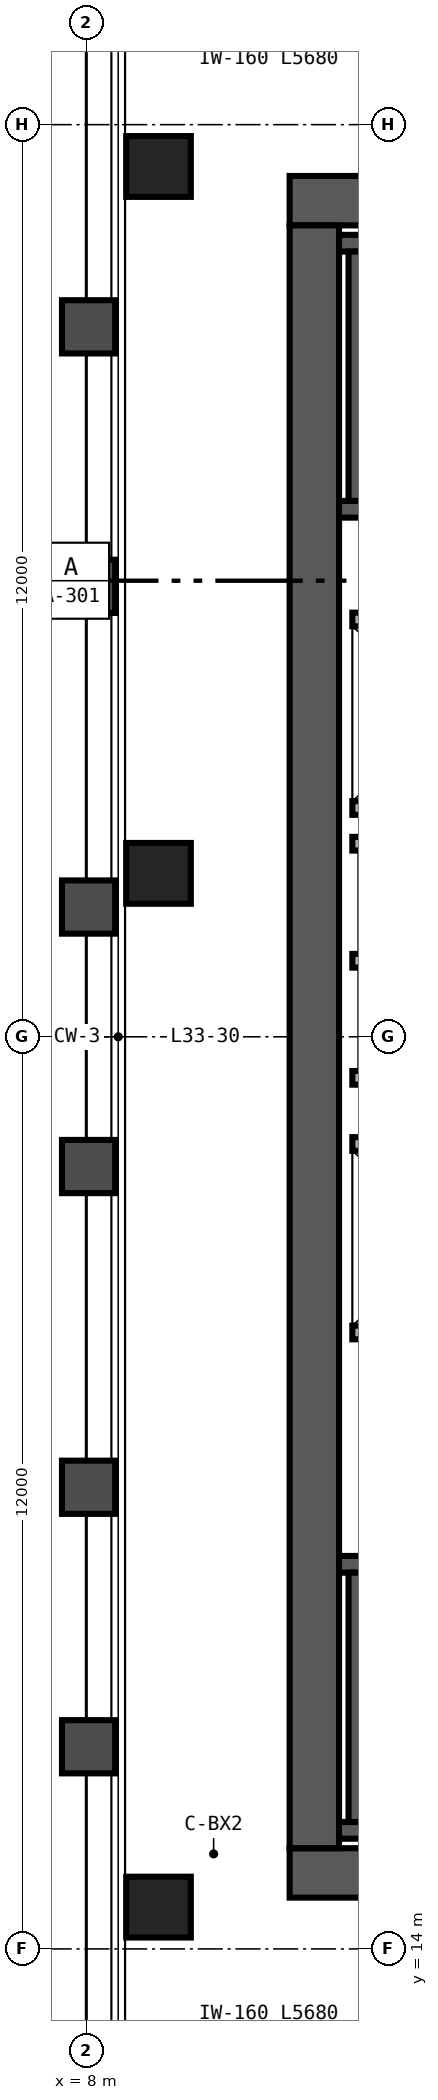
"""IFC4 building model, lengths in metres.
Left out: names, types, materials, properties, quantities, classifications, styles, units other than length and angle.
Written with IfcOpenShell. Run it as: python <this file> out.ifc"""

import sys

from ifc_helpers import new_model, si_unit, direction, frame, frame_2d, origin, origin_2d, place, context, subcontext, project, spatial, rectangle, hollow_rectangle, extrude, source, transform, mapped, element, save


model = new_model("IFC4")
c1 = context("Model", 3, precision=1e-05, world=origin(), true_north=direction((0.0, 1.0)))
c2 = subcontext(c1, "Body", "Model", "MODEL_VIEW")
j1 = project(units=[si_unit("LENGTHUNIT", "METRE"), si_unit("PLANEANGLEUNIT", "RADIAN")], contexts=[c1])
p1 = place(None, origin())
s1 = spatial("IfcSite", under=j1, at=p1, CompositionType="ELEMENT")
p2 = place(p1, origin())
s2 = spatial("IfcBuilding", under=s1, at=p2, CompositionType="ELEMENT")
p3 = place(p2, frame((0.0, 0.0, 133.2)))
s3 = spatial("IfcBuildingStorey", under=s2, at=p3, CompositionType="ELEMENT", Elevation=133.2)
p4 = place(p3, frame((10.675, 15.0, 0.0), z_axis=(0.0, 0.0, 1.0), x_axis=(1.0, 0.0, 0.0)))
e1 = element("IfcWall", 1, at=p4, inside=s3, PredefinedType="SHEAR", context=c2, shape_type="SweptSolid", body=[
    extrude(rectangle(XDim=12.65, YDim=0.65, at=frame_2d((6.325, 0.0))), origin(), (0.0, 0.0, 1.0), 3.36),
])
p5 = place(p4, frame((10.225, 0.0, 0.0)))
e2 = element("IfcOpeningElement", 2, at=p5, cuts=e1, PredefinedType="OPENING", context=c2, shape_type="SweptSolid", body=[
    extrude(rectangle(XDim=1.0, YDim=2.15, at=frame_2d((0.5, 1.075))), frame((0.0, 0.335, 0.0), z_axis=(0.0, -1.0, 0.0), x_axis=(1.0, 0.0, 0.0)), (0.0, 0.0, 1.0), 0.67),
])
p6 = place(p3, frame((10.675, 37.0, 0.0), z_axis=(0.0, 0.0, 1.0), x_axis=(1.0, 0.0, 0.0)))
e3 = element("IfcWall", 3, at=p6, inside=s3, PredefinedType="SHEAR", context=c2, shape_type="SweptSolid", body=[
    extrude(rectangle(XDim=12.65, YDim=0.65, at=frame_2d((6.325, 0.0))), origin(), (0.0, 0.0, 1.0), 3.36),
])
p7 = place(p6, frame((8.905, 0.0, 0.0)))
e4 = element("IfcOpeningElement", 4, at=p7, cuts=e3, PredefinedType="OPENING", context=c2, shape_type="SweptSolid", body=[
    extrude(rectangle(XDim=1.0, YDim=2.15, at=frame_2d((0.5, 1.075))), frame((0.0, 0.335, 0.0), z_axis=(0.0, -1.0, 0.0), x_axis=(1.0, 0.0, 0.0)), (0.0, 0.0, 1.0), 0.67),
])
p8 = place(p3, frame((11.0, 15.325, 0.0), z_axis=(0.0, 0.0, 1.0), x_axis=(0.0, 1.0, 0.0)))
e5 = element("IfcWall", 5, at=p8, inside=s3, PredefinedType="SHEAR", context=c2, shape_type="SweptSolid", body=[
    extrude(rectangle(XDim=21.35, YDim=0.65, at=frame_2d((10.675, 0.0))), origin(), (0.0, 0.0, 1.0), 3.36),
])
p9 = place(p3, frame((11.325, 15.56, 0.0), z_axis=(0.0, 0.0, 1.0), x_axis=(1.0, 0.0, 0.0)))
e6 = element("IfcWall", 6, at=p9, inside=s3, PredefinedType="SHEAR", context=c2, shape_type="SweptSolid", body=[
    extrude(rectangle(XDim=7.985, YDim=0.22, at=frame_2d((3.993, 0.0))), origin(), (0.0, 0.0, 1.0), 3.4),
])
p10 = place(p3, frame((11.325, 19.06, 0.0), z_axis=(0.0, 0.0, 1.0), x_axis=(1.0, 0.0, 0.0)))
e7 = element("IfcWall", 7, at=p10, inside=s3, PredefinedType="SHEAR", context=c2, shape_type="SweptSolid", body=[
    extrude(rectangle(XDim=7.985, YDim=0.22, at=frame_2d((3.993, 0.0))), origin(), (0.0, 0.0, 1.0), 3.4),
])
p11 = place(p10, frame((0.595, 0.0, 0.0)))
e8 = element("IfcOpeningElement", 8, at=p11, cuts=e7, PredefinedType="OPENING", context=c2, shape_type="SweptSolid", body=[
    extrude(rectangle(XDim=1.05, YDim=2.15, at=frame_2d((0.525, 1.075))), frame((0.0, 0.12, 0.0), z_axis=(0.0, -1.0, 0.0), x_axis=(1.0, 0.0, 0.0)), (0.0, 0.0, 1.0), 0.24),
])
p12 = place(p3, frame((11.56, 15.67, 0.0), z_axis=(0.0, 0.0, 1.0), x_axis=(0.0, 1.0, 0.0)))
e9 = element("IfcWall", 9, at=p12, inside=s3, PredefinedType="SHEAR", context=c2, shape_type="SweptSolid", body=[
    extrude(rectangle(XDim=3.28, YDim=0.22, at=frame_2d((1.64, 0.0))), origin(), (0.0, 0.0, 1.0), 3.4),
])
p13 = place(p3, frame((11.325, 32.94, 0.0), z_axis=(0.0, 0.0, 1.0), x_axis=(1.0, 0.0, 0.0)))
e10 = element("IfcWall", 10, at=p13, inside=s3, PredefinedType="SHEAR", context=c2, shape_type="SweptSolid", body=[
    extrude(rectangle(XDim=7.985, YDim=0.22, at=frame_2d((3.993, 0.0))), origin(), (0.0, 0.0, 1.0), 3.4),
])
p14 = place(p13, frame((0.595, 0.0, 0.0)))
e11 = element("IfcOpeningElement", 11, at=p14, cuts=e10, PredefinedType="OPENING", context=c2, shape_type="SweptSolid", body=[
    extrude(rectangle(XDim=1.05, YDim=2.15, at=frame_2d((0.525, 1.075))), frame((0.0, 0.12, 0.0), z_axis=(0.0, -1.0, 0.0), x_axis=(1.0, 0.0, 0.0)), (0.0, 0.0, 1.0), 0.24),
])
p15 = place(p3, frame((11.325, 36.44, 0.0), z_axis=(0.0, 0.0, 1.0), x_axis=(1.0, 0.0, 0.0)))
e12 = element("IfcWall", 12, at=p15, inside=s3, PredefinedType="SHEAR", context=c2, shape_type="SweptSolid", body=[
    extrude(rectangle(XDim=7.985, YDim=0.22, at=frame_2d((3.993, 0.0))), origin(), (0.0, 0.0, 1.0), 3.4),
])
p16 = place(p3, frame((11.56, 33.05, 0.0), z_axis=(0.0, 0.0, 1.0), x_axis=(0.0, 1.0, 0.0)))
e13 = element("IfcWall", 13, at=p16, inside=s3, PredefinedType="SHEAR", context=c2, shape_type="SweptSolid", body=[
    extrude(rectangle(XDim=3.28, YDim=0.22, at=frame_2d((1.64, 0.0))), origin(), (0.0, 0.0, 1.0), 3.4),
])
m1 = source(origin(), c2, "Body", "SweptSolid", [
    extrude(hollow_rectangle(XDim=0.85, YDim=0.8, WallThickness=0.032, at=origin_2d()), origin(), (0.0, 0.0, 1.0), 3.36),
])
for number, where, z_axis, x_axis in (
    (14, (8.95, 14.55, 0.0), (0.0, 0.0, 1.0), (1.0, 0.0, 0.0)),
    (15, (8.95, 28.15, 0.0), (0.0, 0.0, 1.0), (1.0, 0.0, 0.0)),
    (16, (8.95, 37.45, 0.0), (0.0, 0.0, 1.0), (1.0, 0.0, 0.0)),
):
    element("IfcColumn", number, at=place(p3, frame(where, z_axis=z_axis, x_axis=x_axis)), inside=s3, PredefinedType="COLUMN", context=c2, shape_type="MappedRepresentation", body=[
        mapped(m1, transform((0.0, 0.0, 0.0), scale=1.0)),
    ])
for number, where, z_axis, x_axis in (
    (17, (11.5, 22.11, 0.0), (0.0, 0.0, 1.0), (1.0, 0.0, 0.0)),
    (18, (11.5, 24.59, 0.0), (0.0, 0.0, 1.0), (1.0, 0.0, 0.0)),
    (19, (11.5, 29.01, 0.0), (0.0, 0.0, 1.0), (1.0, 0.0, 0.0)),
    (20, (11.5, 31.49, 0.0), (0.0, 0.0, 1.0), (1.0, 0.0, 0.0)),
):
    element("IfcWall", number, at=place(p3, frame(where, z_axis=z_axis, x_axis=x_axis)), inside=s3, PredefinedType="SOLIDWALL", context=c2, shape_type="SweptSolid", body=[
        extrude(rectangle(XDim=2.5, YDim=0.18, at=frame_2d((1.25, 0.0))), origin(), (0.0, 0.0, 1.0), 3.36),
    ])
for number, where, z_axis, x_axis in (
    (21, (11.5, 25.46, 0.0), (0.0, 0.0, 1.0), (1.0, 0.0, 0.0)),
    (22, (11.5, 27.0, 0.0), (0.0, 0.0, 1.0), (1.0, 0.0, 0.0)),
    (23, (11.5, 28.54, 0.0), (0.0, 0.0, 1.0), (1.0, 0.0, 0.0)),
):
    element("IfcWall", number, at=place(p3, frame(where, z_axis=z_axis, x_axis=x_axis)), inside=s3, PredefinedType="SOLIDWALL", context=c2, shape_type="SweptSolid", body=[
        extrude(rectangle(XDim=2.51, YDim=0.18, at=frame_2d((1.255, 0.0))), origin(), (0.0, 0.0, 1.0), 3.36),
    ])
save(model, sys.argv[1])
